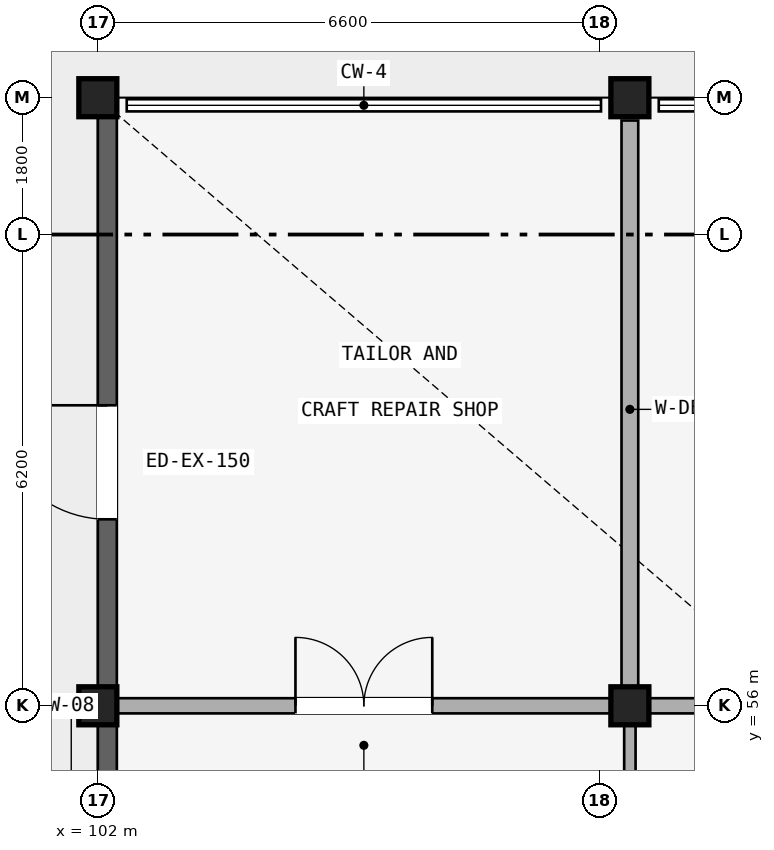
"""IFC4 building model, lengths in metres.
Left out: names, types, materials, properties, quantities, classifications, styles, units other than length and angle.
Written with IfcOpenShell. Run it as: python <this file> out.ifc"""

import sys

from ifc_helpers import new_model, si_unit, direction, frame, frame_2d, origin, origin_2d, place, context, subcontext, project, spatial, rectangle, extrude, element, fill, save


model = new_model("IFC4")
c1 = context("Model", 3, precision=1e-05, world=origin(), true_north=direction((0.0, 1.0)))
c2 = subcontext(c1, "Body", "Model", "MODEL_VIEW")
j1 = project(units=[si_unit("LENGTHUNIT", "METRE"), si_unit("PLANEANGLEUNIT", "RADIAN")], contexts=[c1])
p1 = place(None, origin())
s1 = spatial("IfcSite", under=j1, at=p1, CompositionType="ELEMENT")
p2 = place(p1, origin())
s2 = spatial("IfcBuilding", under=s1, at=p2, CompositionType="ELEMENT")
p3 = place(p2, origin())
s3 = spatial("IfcBuildingStorey", under=s2, at=p3, CompositionType="ELEMENT", Elevation=0.0)
for number, where, z_axis, x_axis in (
    (1, (102.0, 56.0, 0.0), (0.0, 0.0, 1.0), (1.0, 0.0, 0.0)),
    (2, (102.0, 64.0, 0.0), (0.0, 0.0, 1.0), (1.0, 0.0, 0.0)),
    (3, (109.0, 56.0, 0.0), (0.0, 0.0, 1.0), (1.0, 0.0, 0.0)),
    (4, (109.0, 64.0, 0.0), (0.0, 0.0, 1.0), (1.0, 0.0, 0.0)),
):
    element("IfcColumn", number, at=place(p3, frame(where, z_axis=z_axis, x_axis=x_axis)), inside=s3, PredefinedType="COLUMN", context=c2, shape_type="SweptSolid", body=[
        extrude(rectangle(XDim=0.5, YDim=0.5, at=origin_2d()), origin(), (0.0, 0.0, 1.0), 4.28),
    ])
p4 = place(p3, frame((102.15, 56.0, 0.0), z_axis=(0.0, 0.0, 1.0), x_axis=(1.0, 0.0, 0.0)))
e5 = element("IfcWall", 5, at=p4, inside=s3, PredefinedType="STANDARD", context=c2, shape_type="SweptSolid", body=[
    extrude(rectangle(XDim=6.7, YDim=0.2, at=frame_2d((3.35, 0.0))), origin(), (0.0, 0.0, 1.0), 3.672),
])
p5 = place(p4, frame((2.45, 0.0, 0.0)))
e6 = element("IfcOpeningElement", 6, at=p5, cuts=e5, PredefinedType="OPENING", context=c2, shape_type="SweptSolid", body=[
    extrude(rectangle(XDim=1.8, YDim=2.2, at=frame_2d((0.9, 1.1))), frame((0.0, 0.11, 0.0), z_axis=(0.0, -1.0, 0.0), x_axis=(1.0, 0.0, 0.0)), (0.0, 0.0, 1.0), 0.22),
])
p6 = place(p3, frame((109.15, 56.0, 0.0), z_axis=(0.0, 0.0, 1.0), x_axis=(1.0, 0.0, 0.0)))
e7 = element("IfcWall", 7, at=p6, inside=s3, PredefinedType="STANDARD", context=c2, shape_type="SweptSolid", body=[
    extrude(rectangle(XDim=6.7, YDim=0.2, at=frame_2d((3.35, 0.0))), origin(), (0.0, 0.0, 1.0), 3.672),
])
p7 = place(p6, frame((2.45, 0.0, 0.0)))
e8 = element("IfcOpeningElement", 8, at=p7, cuts=e7, PredefinedType="OPENING", context=c2, shape_type="SweptSolid", body=[
    extrude(rectangle(XDim=1.8, YDim=2.2, at=frame_2d((0.9, 1.1))), frame((0.0, 0.11, 0.0), z_axis=(0.0, -1.0, 0.0), x_axis=(1.0, 0.0, 0.0)), (0.0, 0.0, 1.0), 0.22),
])
p8 = place(p3, frame((109.0, 48.1, 0.0), z_axis=(0.0, 0.0, 1.0), x_axis=(0.0, 1.0, 0.0)))
e9 = element("IfcWall", 9, at=p8, inside=s3, PredefinedType="PARTITIONING", context=c2, shape_type="SweptSolid", body=[
    extrude(rectangle(XDim=7.8, YDim=0.15, at=frame_2d((3.9, 0.0))), origin(), (0.0, 0.0, 1.0), 3.672),
])
p9 = place(p8, frame((3.0, 0.0, 0.0)))
e10 = element("IfcOpeningElement", 10, at=p9, cuts=e9, PredefinedType="OPENING", context=c2, shape_type="SweptSolid", body=[
    extrude(rectangle(XDim=1.8, YDim=2.2, at=frame_2d((0.9, 1.1))), frame((0.0, 0.085, 0.0), z_axis=(0.0, -1.0, 0.0), x_axis=(1.0, 0.0, 0.0)), (0.0, 0.0, 1.0), 0.17),
])
p10 = place(p3, frame((109.0, 56.1, 0.0), z_axis=(0.0, 0.0, 1.0), x_axis=(0.0, 1.0, 0.0)))
e11 = element("IfcWall", 11, at=p10, inside=s3, PredefinedType="STANDARD", context=c2, shape_type="SweptSolid", body=[
    extrude(rectangle(XDim=7.6, YDim=0.22, at=frame_2d((3.8, 0.0))), origin(), (0.0, 0.0, 1.0), 3.672),
])
p11 = place(p3, frame((102.125, 48.253, 0.0), z_axis=(0.0, 0.0, 1.0), x_axis=(0.0, 1.0, 0.0)))
e12 = element("IfcWall", 12, at=p11, inside=s3, PredefinedType="STANDARD", context=c2, shape_type="SweptSolid", body=[
    extrude(rectangle(XDim=7.493, YDim=0.25, at=frame_2d((3.747, 0.0))), origin(), (0.0, 0.0, 1.0), 3.672),
])
p12 = place(p11, frame((2.747, 0.0, 0.88)))
e13 = element("IfcOpeningElement", 13, at=p12, cuts=e12, PredefinedType="OPENING", context=c2, shape_type="SweptSolid", body=[
    extrude(rectangle(XDim=2.0, YDim=1.95, at=frame_2d((1.0, 0.975))), frame((0.0, 0.135, 0.0), z_axis=(0.0, -1.0, 0.0), x_axis=(1.0, 0.0, 0.0)), (0.0, 0.0, 1.0), 0.27),
])
p13 = place(p3, frame((102.125, 56.253, 0.0), z_axis=(0.0, 0.0, 1.0), x_axis=(0.0, 1.0, 0.0)))
e14 = element("IfcWall", 14, at=p13, inside=s3, PredefinedType="STANDARD", context=c2, shape_type="SweptSolid", body=[
    extrude(rectangle(XDim=7.493, YDim=0.25, at=frame_2d((3.747, 0.0))), origin(), (0.0, 0.0, 1.0), 3.672),
])
p14 = place(p13, frame((2.2, 0.0, 0.0)))
e15 = element("IfcOpeningElement", 15, at=p14, cuts=e14, PredefinedType="OPENING", context=c2, shape_type="SweptSolid", body=[
    extrude(rectangle(XDim=1.5, YDim=2.15, at=frame_2d((0.75, 1.075))), frame((0.0, 0.135, 0.0), z_axis=(0.0, -1.0, 0.0), x_axis=(1.0, 0.0, 0.0)), (0.0, 0.0, 1.0), 0.27),
])
p15 = place(p5, origin())
e16 = element("IfcDoor", 16, at=p15, inside=s3, OperationType="DOUBLE_DOOR_SINGLE_SWING", PredefinedType="DOOR", context=c2, shape_type="SweptSolid", body=[
    extrude(rectangle(XDim=1.8, YDim=2.2, at=frame_2d((0.9, 1.1))), frame((0.0, 0.025, 0.0), z_axis=(0.0, -1.0, 0.0), x_axis=(1.0, 0.0, 0.0)), (0.0, 0.0, 1.0), 0.05),
])
fill(e6, e16)
p16 = place(p14, origin())
e17 = element("IfcDoor", 17, at=p16, inside=s3, OperationType="SINGLE_SWING_RIGHT", PredefinedType="DOOR", context=c2, shape_type="SweptSolid", body=[
    extrude(rectangle(XDim=1.5, YDim=2.15, at=frame_2d((0.75, 1.075))), frame((0.0, 0.025, 0.0), z_axis=(0.0, -1.0, 0.0), x_axis=(1.0, 0.0, 0.0)), (0.0, 0.0, 1.0), 0.05),
])
fill(e15, e17)
save(model, sys.argv[1])
